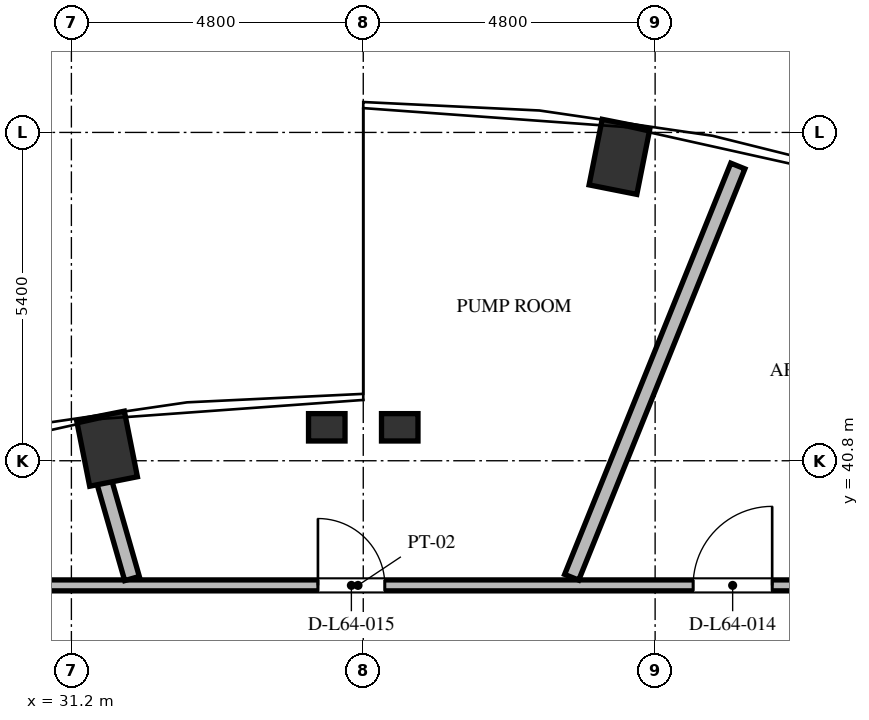
"""IFC4 building model, lengths in metres.
Left out: names, types, materials, properties, quantities, classifications, styles, units other than length and angle.
Written with IfcOpenShell. Run it as: python <this file> out.ifc"""

import sys

from ifc_helpers import new_model, si_unit, direction, frame, frame_2d, origin, origin_2d, place, context, subcontext, project, spatial, rectangle, extrude, element, fill, save


model = new_model("IFC4")
c1 = context("Model", 3, precision=1e-05, world=origin(), true_north=direction((0.0, 1.0)))
c2 = subcontext(c1, "Body", "Model", "MODEL_VIEW")
j1 = project(units=[si_unit("LENGTHUNIT", "METRE"), si_unit("PLANEANGLEUNIT", "RADIAN")], contexts=[c1])
p1 = place(None, origin())
s1 = spatial("IfcSite", under=j1, at=p1, CompositionType="ELEMENT")
p2 = place(p1, origin())
s2 = spatial("IfcBuilding", under=s1, at=p2, CompositionType="ELEMENT")
p3 = place(p2, frame((0.0, 0.0, 245.904)))
s3 = spatial("IfcBuildingStorey", under=s2, at=p3, CompositionType="ELEMENT", Elevation=245.904)
for number, where, z_axis, x_axis in (
    (1, (40.214, 45.798, 0.0), (0.0, 0.0, 1.0), (0.195, 0.981, 0.0)),
    (2, (31.786, 40.998, 0.0), (0.0, 0.0, 1.0), (-0.195, 0.981, 0.0)),
):
    element("IfcColumn", number, at=place(p3, frame(where, z_axis=z_axis, x_axis=x_axis)), inside=s3, PredefinedType="COLUMN", context=c2, shape_type="SweptSolid", body=[
        extrude(rectangle(XDim=1.1, YDim=0.8, at=origin_2d()), origin(), (0.0, 0.0, 1.0), 5.472),
    ])
for number, where, z_axis, x_axis in (
    (3, (35.4, 41.35, 0.0), (0.0, 0.0, 1.0), (1.0, 0.0, 0.0)),
    (4, (36.6, 41.35, 0.0), (0.0, 0.0, 1.0), (1.0, 0.0, 0.0)),
):
    element("IfcColumn", number, at=place(p3, frame(where, z_axis=z_axis, x_axis=x_axis)), inside=s3, PredefinedType="PILASTER", context=c2, shape_type="SweptSolid", body=[
        extrude(rectangle(XDim=0.6, YDim=0.45, at=origin_2d()), origin(), (0.0, 0.0, 1.0), 5.472),
    ])
p4 = place(p3, frame((30.71, 38.75, 0.0), z_axis=(0.0, 0.0, 1.0), x_axis=(1.0, 0.0, 0.0)))
e5 = element("IfcWall", 5, at=p4, inside=s3, PredefinedType="PARTITIONING", context=c2, shape_type="SweptSolid", body=[
    extrude(rectangle(XDim=20.815, YDim=0.18, at=frame_2d((10.408, 0.0))), origin(), (0.0, 0.0, 1.0), 4.897),
])
p5 = place(p4, frame((16.846, 0.0, 0.0)))
e6 = element("IfcOpeningElement", 6, at=p5, cuts=e5, PredefinedType="OPENING", context=c2, shape_type="SweptSolid", body=[
    extrude(rectangle(XDim=0.95, YDim=2.1, at=frame_2d((0.475, 1.05))), frame((0.0, 0.1, 0.0), z_axis=(0.0, -1.0, 0.0), x_axis=(1.0, 0.0, 0.0)), (0.0, 0.0, 1.0), 0.2),
])
p6 = place(p4, frame((10.715, 0.0, 0.0)))
e7 = element("IfcOpeningElement", 7, at=p6, cuts=e5, PredefinedType="OPENING", context=c2, shape_type="SweptSolid", body=[
    extrude(rectangle(XDim=1.3, YDim=2.2, at=frame_2d((0.65, 1.1))), frame((0.0, 0.1, 0.0), z_axis=(0.0, -1.0, 0.0), x_axis=(1.0, 0.0, 0.0)), (0.0, 0.0, 1.0), 0.2),
])
p7 = place(p4, frame((4.545, 0.0, 0.0)))
e8 = element("IfcOpeningElement", 8, at=p7, cuts=e5, PredefinedType="OPENING", context=c2, shape_type="SweptSolid", body=[
    extrude(rectangle(XDim=1.1, YDim=2.15, at=frame_2d((0.55, 1.075))), frame((0.0, 0.1, 0.0), z_axis=(0.0, -1.0, 0.0), x_axis=(1.0, 0.0, 0.0)), (0.0, 0.0, 1.0), 0.2),
])
p8 = place(p3, frame((39.428, 38.884, 0.0), z_axis=(0.0, 0.0, 1.0), x_axis=(0.374590867969, 0.927190207905, 0.0)))
e9 = element("IfcWall", 9, at=p8, inside=s3, PredefinedType="SOLIDWALL", context=c2, shape_type="SweptSolid", body=[
    extrude(rectangle(XDim=7.295, YDim=0.25, at=frame_2d((3.647, 0.0))), origin(), (0.0, 0.0, 1.0), 5.272),
])
p9 = place(p3, frame((32.197, 38.863, 0.0), z_axis=(0.0, 0.0, 1.0), x_axis=(-0.2757058954, 0.961242039885, 0.0)))
e10 = element("IfcWall", 10, at=p9, inside=s3, PredefinedType="SOLIDWALL", context=c2, shape_type="SweptSolid", body=[
    extrude(rectangle(XDim=2.324, YDim=0.25, at=frame_2d((1.162, 0.0))), origin(), (0.0, 0.0, 1.0), 4.757),
])
p10 = place(p6, origin())
e11 = element("IfcDoor", 11, at=p10, inside=s3, OperationType="SINGLE_SWING_RIGHT", PredefinedType="DOOR", context=c2, shape_type="SweptSolid", body=[
    extrude(rectangle(XDim=1.3, YDim=2.2, at=frame_2d((0.65, 1.1))), frame((0.0, 0.025, 0.0), z_axis=(0.0, -1.0, 0.0), x_axis=(1.0, 0.0, 0.0)), (0.0, 0.0, 1.0), 0.05),
])
fill(e7, e11)
p11 = place(p7, origin())
e12 = element("IfcDoor", 12, at=p11, inside=s3, OperationType="SINGLE_SWING_LEFT", PredefinedType="DOOR", context=c2, shape_type="SweptSolid", body=[
    extrude(rectangle(XDim=1.1, YDim=2.15, at=frame_2d((0.55, 1.075))), frame((0.0, 0.025, 0.0), z_axis=(0.0, -1.0, 0.0), x_axis=(1.0, 0.0, 0.0)), (0.0, 0.0, 1.0), 0.05),
])
fill(e8, e12)
save(model, sys.argv[1])
